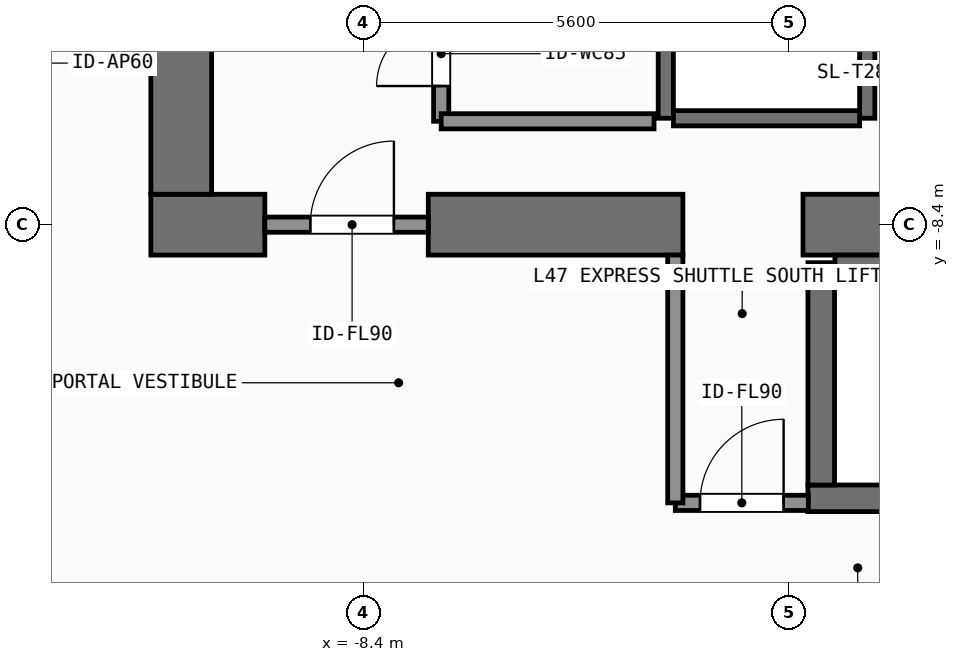
"""IFC4 building model, lengths in metres.
Left out: names, types, materials, properties, quantities, classifications, styles, units other than length and angle.
Written with IfcOpenShell. Run it as: python <this file> out.ifc"""

import sys

from ifc_helpers import new_model, si_unit, direction, frame, frame_2d, origin, place, context, subcontext, project, spatial, rectangle, extrude, element, fill, save


model = new_model("IFC4")
c1 = context("Model", 3, precision=1e-05, world=origin(), true_north=direction((0.0, 1.0)))
c2 = subcontext(c1, "Body", "Model", "MODEL_VIEW")
j1 = project(units=[si_unit("LENGTHUNIT", "METRE"), si_unit("PLANEANGLEUNIT", "RADIAN")], contexts=[c1])
p1 = place(None, origin())
s1 = spatial("IfcSite", under=j1, at=p1, CompositionType="ELEMENT")
p2 = place(p1, origin())
s2 = spatial("IfcBuilding", under=s1, at=p2, CompositionType="ELEMENT")
p3 = place(p2, frame((0.0, 0.0, 191.4)))
s3 = spatial("IfcBuildingStorey", under=s2, at=p3, CompositionType="ELEMENT", Elevation=191.4)
p4 = place(p3, frame((-11.2, -8.4, 0.0), z_axis=(0.0, 0.0, 1.0), x_axis=(1.0, 0.0, 0.0)))
e1 = element("IfcWall", 1, at=p4, inside=s3, PredefinedType="SHEAR", context=c2, shape_type="SweptSolid", body=[
    extrude(rectangle(XDim=1.5, YDim=0.8, at=frame_2d((0.75, 0.0))), origin(), (0.0, 0.0, 1.0), 3.9),
])
p5 = place(p3, frame((-7.55, -8.4, 0.0), z_axis=(0.0, 0.0, 1.0), x_axis=(1.0, 0.0, 0.0)))
e2 = element("IfcWall", 2, at=p5, inside=s3, PredefinedType="SHEAR", context=c2, shape_type="SweptSolid", body=[
    extrude(rectangle(XDim=3.35, YDim=0.8, at=frame_2d((1.675, 0.0))), origin(), (0.0, 0.0, 1.0), 3.9),
])
p6 = place(p3, frame((-2.62, -8.4, 0.0), z_axis=(0.0, 0.0, 1.0), x_axis=(1.0, 0.0, 0.0)))
e3 = element("IfcWall", 3, at=p6, inside=s3, PredefinedType="SHEAR", context=c2, shape_type="SweptSolid", body=[
    extrude(rectangle(XDim=7.27, YDim=0.8, at=frame_2d((3.635, 0.0))), origin(), (0.0, 0.0, 1.0), 3.9),
])
p7 = place(p3, frame((-10.8, -8.0, 0.0), z_axis=(0.0, 0.0, 1.0), x_axis=(0.0, 1.0, 0.0)))
e4 = element("IfcWall", 4, at=p7, inside=s3, PredefinedType="SHEAR", context=c2, shape_type="SweptSolid", body=[
    extrude(rectangle(XDim=16.0, YDim=0.8, at=frame_2d((8.0, 0.0))), origin(), (0.0, 0.0, 1.0), 3.9),
])
p8 = place(p3, frame((-2.555, -12.0, 0.0), z_axis=(0.0, 0.0, 1.0), x_axis=(1.0, 0.0, 0.0)))
e5 = element("IfcWall", 5, at=p8, inside=s3, PredefinedType="SHEAR", context=c2, shape_type="SweptSolid", body=[
    extrude(rectangle(XDim=7.31, YDim=0.35, at=frame_2d((3.655, 0.0))), origin(), (0.0, 0.0, 1.0), 3.9),
])
p9 = place(p3, frame((-2.2, -8.913, 0.0), z_axis=(0.0, 0.0, 1.0), x_axis=(1.0, 0.0, 0.0)))
e6 = element("IfcWall", 6, at=p9, inside=s3, PredefinedType="SHEAR", context=c2, shape_type="SweptSolid", body=[
    extrude(rectangle(XDim=6.6, YDim=0.225, at=frame_2d((3.3, 0.0))), origin(), (0.0, 0.0, 1.0), 3.9),
])
p10 = place(p3, frame((-2.38, -11.825, 0.0), z_axis=(0.0, 0.0, 1.0), x_axis=(0.0, 1.0, 0.0)))
e7 = element("IfcWall", 7, at=p10, inside=s3, PredefinedType="SHEAR", context=c2, shape_type="SweptSolid", body=[
    extrude(rectangle(XDim=2.925, YDim=0.35, at=frame_2d((1.462, 0.0))), origin(), (0.0, 0.0, 1.0), 3.9),
])
for number, where, z_axis, x_axis in (
    (8, (-4.425, -7.0, 0.0), (0.0, 0.0, 1.0), (0.0, 1.0, 0.0)),
    (9, (-1.775, -7.0, 0.0), (0.0, 0.0, 1.0), (0.0, 1.0, 0.0)),
):
    element("IfcWall", number, at=place(p3, frame(where, z_axis=z_axis, x_axis=x_axis)), inside=s3, PredefinedType="SHEAR", context=c2, shape_type="SweptSolid", body=[
        extrude(rectangle(XDim=2.8, YDim=0.2, at=frame_2d((1.4, 0.0))), origin(), (0.0, 0.0, 1.0), 3.68),
    ])
p11 = place(p3, frame((-4.325, -7.0, 0.0), z_axis=(0.0, 0.0, 1.0), x_axis=(1.0, 0.0, 0.0)))
e10 = element("IfcWall", 10, at=p11, inside=s3, PredefinedType="SHEAR", context=c2, shape_type="SweptSolid", body=[
    extrude(rectangle(XDim=2.45, YDim=0.2, at=frame_2d((1.225, 0.0))), origin(), (0.0, 0.0, 1.0), 3.68),
])
p12 = place(p3, frame((-9.7, -8.4, 0.0), z_axis=(0.0, 0.0, 1.0), x_axis=(1.0, 0.0, 0.0)))
e11 = element("IfcWall", 11, at=p12, inside=s3, PredefinedType="SOLIDWALL", context=c2, shape_type="SweptSolid", body=[
    extrude(rectangle(XDim=2.15, YDim=0.2, at=frame_2d((1.075, 0.0))), origin(), (0.0, 0.0, 1.0), 2.82),
])
p13 = place(p12, frame((0.598, 0.0, 0.0)))
e12 = element("IfcOpeningElement", 12, at=p13, cuts=e11, PredefinedType="OPENING", context=c2, shape_type="SweptSolid", body=[
    extrude(rectangle(XDim=1.1, YDim=2.15, at=frame_2d((0.55, 1.075))), frame((0.0, 0.11, 0.0), z_axis=(0.0, -1.0, 0.0), x_axis=(1.0, 0.0, 0.0)), (0.0, 0.0, 1.0), 0.22),
])
p14 = place(p3, frame((-4.3, -12.06, 0.0), z_axis=(0.0, 0.0, 1.0), x_axis=(1.0, 0.0, 0.0)))
e13 = element("IfcWall", 13, at=p14, inside=s3, PredefinedType="SOLIDWALL", context=c2, shape_type="SweptSolid", body=[
    extrude(rectangle(XDim=1.75, YDim=0.2, at=frame_2d((0.875, 0.0))), origin(), (0.0, 0.0, 1.0), 3.68),
])
p15 = place(p14, frame((0.325, 0.0, 0.0)))
e14 = element("IfcOpeningElement", 14, at=p15, cuts=e13, PredefinedType="OPENING", context=c2, shape_type="SweptSolid", body=[
    extrude(rectangle(XDim=1.1, YDim=2.15, at=frame_2d((0.55, 1.075))), frame((0.0, 0.11, 0.0), z_axis=(0.0, -1.0, 0.0), x_axis=(1.0, 0.0, 0.0)), (0.0, 0.0, 1.0), 0.22),
])
p16 = place(p3, frame((-7.38, -7.04, 0.0), z_axis=(0.0, 0.0, 1.0), x_axis=(0.0, 1.0, 0.0)))
e15 = element("IfcWall", 15, at=p16, inside=s3, PredefinedType="SOLIDWALL", context=c2, shape_type="SweptSolid", body=[
    extrude(rectangle(XDim=1.93, YDim=0.2, at=frame_2d((0.965, 0.0))), origin(), (0.0, 0.0, 1.0), 3.68),
])
p17 = place(p16, frame((0.464, 0.0, 0.0)))
e16 = element("IfcOpeningElement", 16, at=p17, cuts=e15, PredefinedType="OPENING", context=c2, shape_type="SweptSolid", body=[
    extrude(rectangle(XDim=0.85, YDim=2.1, at=frame_2d((0.425, 1.05))), frame((0.0, 0.11, 0.0), z_axis=(0.0, -1.0, 0.0), x_axis=(1.0, 0.0, 0.0)), (0.0, 0.0, 1.0), 0.22),
])
p18 = place(p3, frame((-4.3, -12.06, 0.0), z_axis=(0.0, 0.0, 1.0), x_axis=(0.0, 1.0, 0.0)))
e17 = element("IfcWall", 17, at=p18, inside=s3, PredefinedType="SOLIDWALL", context=c2, shape_type="SweptSolid", body=[
    extrude(rectangle(XDim=3.26, YDim=0.2, at=frame_2d((1.63, 0.0))), origin(), (0.0, 0.0, 1.0), 3.68),
])
p19 = place(p3, frame((-7.38, -7.04, 0.0), z_axis=(0.0, 0.0, 1.0), x_axis=(1.0, 0.0, 0.0)))
e18 = element("IfcWall", 18, at=p19, inside=s3, PredefinedType="SOLIDWALL", context=c2, shape_type="SweptSolid", body=[
    extrude(rectangle(XDim=2.8, YDim=0.2, at=frame_2d((1.4, 0.0))), origin(), (0.0, 0.0, 1.0), 3.68),
])
p20 = place(p13, origin())
e19 = element("IfcDoor", 19, at=p20, inside=s3, OperationType="SINGLE_SWING_RIGHT", PredefinedType="DOOR", context=c2, shape_type="SweptSolid", body=[
    extrude(rectangle(XDim=1.1, YDim=2.15, at=frame_2d((0.55, 1.075))), frame((0.0, 0.025, 0.0), z_axis=(0.0, -1.0, 0.0), x_axis=(1.0, 0.0, 0.0)), (0.0, 0.0, 1.0), 0.05),
])
fill(e12, e19)
p21 = place(p15, origin())
e20 = element("IfcDoor", 20, at=p21, inside=s3, OperationType="SINGLE_SWING_RIGHT", PredefinedType="DOOR", context=c2, shape_type="SweptSolid", body=[
    extrude(rectangle(XDim=1.1, YDim=2.15, at=frame_2d((0.55, 1.075))), frame((0.0, 0.025, 0.0), z_axis=(0.0, -1.0, 0.0), x_axis=(1.0, 0.0, 0.0)), (0.0, 0.0, 1.0), 0.05),
])
fill(e14, e20)
p22 = place(p17, origin())
e21 = element("IfcDoor", 21, at=p22, inside=s3, OperationType="SINGLE_SWING_LEFT", PredefinedType="DOOR", context=c2, shape_type="SweptSolid", body=[
    extrude(rectangle(XDim=0.85, YDim=2.1, at=frame_2d((0.425, 1.05))), frame((0.0, 0.025, 0.0), z_axis=(0.0, -1.0, 0.0), x_axis=(1.0, 0.0, 0.0)), (0.0, 0.0, 1.0), 0.05),
])
fill(e16, e21)
save(model, sys.argv[1])
